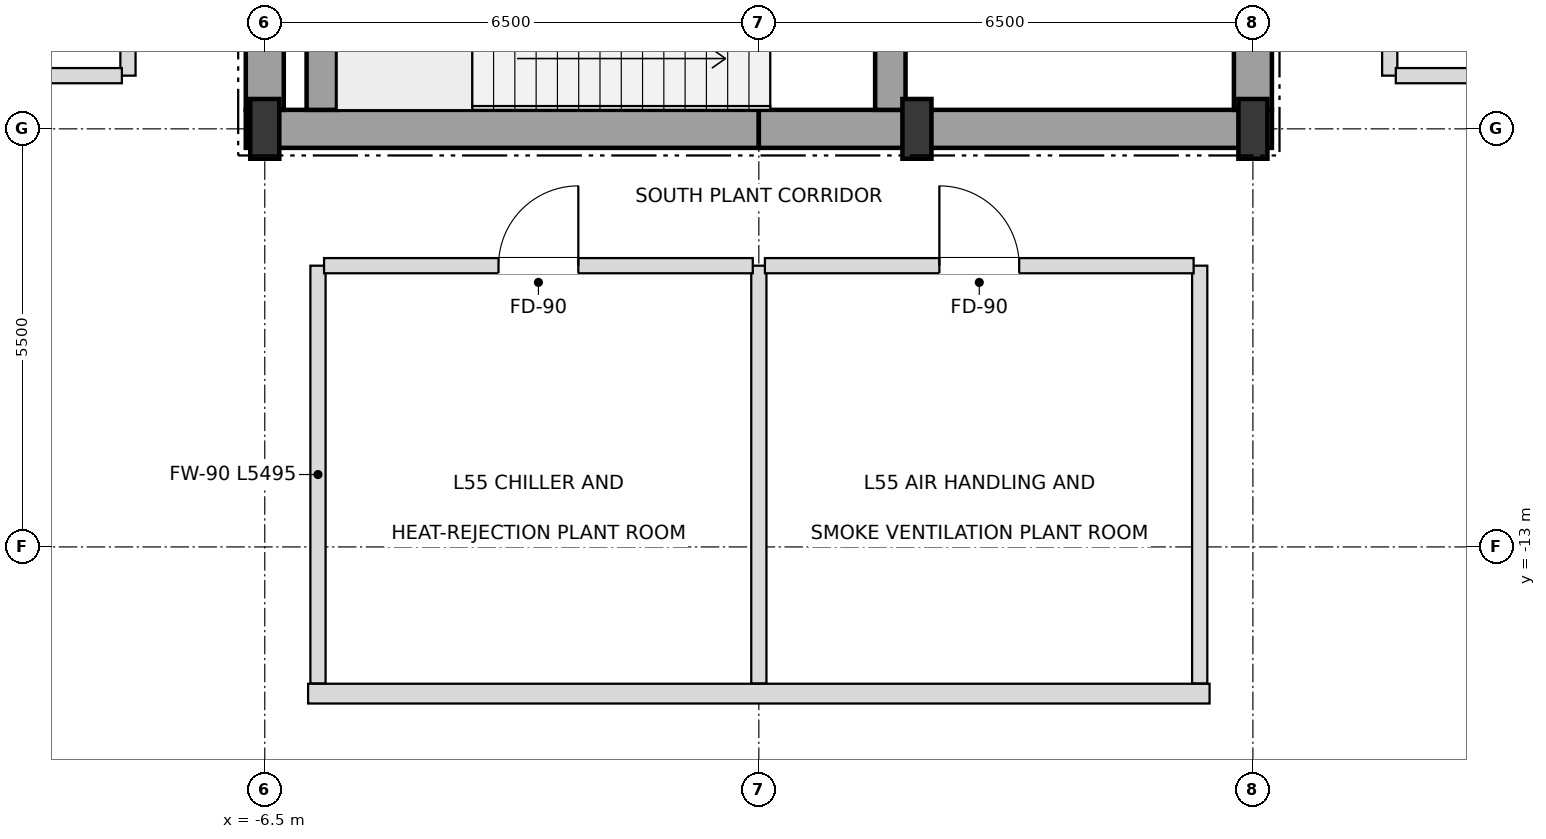
"""IFC4 building model, lengths in metres.
Left out: names, types, materials, properties, quantities, classifications, styles, units other than length and angle.
Written with IfcOpenShell. Run it as: python <this file> out.ifc"""

import sys

from ifc_helpers import new_model, si_unit, direction, frame, frame_2d, origin, origin_2d, place, context, subcontext, project, spatial, rectangle, i_section, extrude, element, fill, save


model = new_model("IFC4")
c1 = context("Model", 3, precision=1e-05, world=origin(), true_north=direction((0.0, 1.0)))
c2 = subcontext(c1, "Body", "Model", "MODEL_VIEW")
j1 = project(units=[si_unit("LENGTHUNIT", "METRE"), si_unit("PLANEANGLEUNIT", "RADIAN")], contexts=[c1])
p1 = place(None, origin())
s1 = spatial("IfcSite", under=j1, at=p1, CompositionType="ELEMENT")
p2 = place(p1, origin())
s2 = spatial("IfcBuilding", under=s1, at=p2, CompositionType="ELEMENT")
p3 = place(p2, frame((0.0, 0.0, 212.4)))
s3 = spatial("IfcBuildingStorey", under=s2, at=p3, CompositionType="ELEMENT", Elevation=212.4)
for number, where, z_axis, x_axis in (
    (1, (-6.5, -7.5, 0.0), (0.0, 0.0, 1.0), (1.0, 0.0, 0.0)),
    (2, (2.08, -7.5, 0.0), (0.0, 0.0, 1.0), (1.0, 0.0, 0.0)),
    (3, (6.5, -7.5, 0.0), (0.0, 0.0, 1.0), (1.0, 0.0, 0.0)),
):
    element("IfcColumn", number, at=place(p3, frame(where, z_axis=z_axis, x_axis=x_axis)), inside=s3, PredefinedType="COLUMN", context=c2, shape_type="SweptSolid", body=[
        extrude(i_section(OverallWidth=0.382, OverallDepth=0.786, WebThickness=0.02, FlangeThickness=0.033, at=origin_2d()), origin(), (0.0, 0.0, 1.0), 5.4),
    ])
p4 = place(p3, frame((-5.93, -14.93, 0.0), z_axis=(0.0, 0.0, 1.0), x_axis=(1.0, 0.0, 0.0)))
e4 = element("IfcWall", 4, at=p4, inside=s3, PredefinedType="SOLIDWALL", context=c2, shape_type="SweptSolid", body=[
    extrude(rectangle(XDim=11.86, YDim=0.26, at=frame_2d((5.93, 0.0))), origin(), (0.0, 0.0, 1.0), 5.1),
])
for number, where, z_axis, x_axis in (
    (5, (-6.75, -7.5, 0.0), (0.0, 0.0, 1.0), (1.0, 0.0, 0.0)),
    (6, (0.0, -7.5, 0.0), (0.0, 0.0, 1.0), (1.0, 0.0, 0.0)),
):
    element("IfcWall", number, at=place(p3, frame(where, z_axis=z_axis, x_axis=x_axis)), inside=s3, PredefinedType="SHEAR", context=c2, shape_type="SweptSolid", body=[
        extrude(rectangle(XDim=6.75, YDim=0.5, at=frame_2d((3.375, 0.0))), origin(), (0.0, 0.0, 1.0), 5.1),
    ])
p5 = place(p3, frame((-6.5, -7.25, 0.0), z_axis=(0.0, 0.0, 1.0), x_axis=(0.0, 1.0, 0.0)))
e7 = element("IfcWall", 7, at=p5, inside=s3, PredefinedType="SHEAR", context=c2, shape_type="SweptSolid", body=[
    extrude(rectangle(XDim=3.55, YDim=0.5, at=frame_2d((1.775, 0.0))), origin(), (0.0, 0.0, 1.0), 5.1),
])
p6 = place(p3, frame((6.5, -7.25, 0.0), z_axis=(0.0, 0.0, 1.0), x_axis=(0.0, 1.0, 0.0)))
e8 = element("IfcWall", 8, at=p6, inside=s3, PredefinedType="SHEAR", context=c2, shape_type="SweptSolid", body=[
    extrude(rectangle(XDim=5.75, YDim=0.5, at=frame_2d((2.875, 0.0))), origin(), (0.0, 0.0, 1.0), 5.1),
])
p7 = place(p6, frame((0.85, 0.0, 0.0)))
e9 = element("IfcOpeningElement", 9, at=p7, cuts=e8, PredefinedType="OPENING", context=c2, shape_type="SweptSolid", body=[
    extrude(rectangle(XDim=1.05, YDim=2.15, at=frame_2d((0.525, 1.075))), frame((0.0, 0.26, 0.0), z_axis=(0.0, -1.0, 0.0), x_axis=(1.0, 0.0, 0.0)), (0.0, 0.0, 1.0), 0.52),
])
p8 = place(p3, frame((-5.75, -7.25, 0.0), z_axis=(0.0, 0.0, 1.0), x_axis=(0.0, 1.0, 0.0)))
e10 = element("IfcWall", 10, at=p8, inside=s3, PredefinedType="SHEAR", context=c2, shape_type="SweptSolid", body=[
    extrude(rectangle(XDim=2.9, YDim=0.4, at=frame_2d((1.45, 0.0))), origin(), (0.0, 0.0, 1.0), 5.1),
])
p9 = place(p3, frame((1.73, -7.25, 0.0), z_axis=(0.0, 0.0, 1.0), x_axis=(0.0, 1.0, 0.0)))
e11 = element("IfcWall", 11, at=p9, inside=s3, PredefinedType="SHEAR", context=c2, shape_type="SweptSolid", body=[
    extrude(rectangle(XDim=3.3, YDim=0.4, at=frame_2d((1.65, 0.0))), origin(), (0.0, 0.0, 1.0), 5.1),
])
p10 = place(p9, frame((0.9, 0.0, 0.0)))
e12 = element("IfcOpeningElement", 12, at=p10, cuts=e11, PredefinedType="OPENING", context=c2, shape_type="SweptSolid", body=[
    extrude(rectangle(XDim=1.05, YDim=2.15, at=frame_2d((0.525, 1.075))), frame((0.0, 0.21, 0.0), z_axis=(0.0, -1.0, 0.0), x_axis=(1.0, 0.0, 0.0)), (0.0, 0.0, 1.0), 0.42),
])
p11 = place(p3, frame((-8.3, -6.8, 0.0), z_axis=(0.0, 0.0, 1.0), x_axis=(0.0, 1.0, 0.0)))
e13 = element("IfcWall", 13, at=p11, inside=s3, PredefinedType="SOLIDWALL", context=c2, shape_type="SweptSolid", body=[
    extrude(rectangle(XDim=13.6, YDim=0.2, at=frame_2d((6.8, 0.0))), origin(), (0.0, 0.0, 1.0), 5.1),
])
p12 = place(p11, frame((6.275, 0.0, 0.0)))
e14 = element("IfcOpeningElement", 14, at=p12, cuts=e13, PredefinedType="OPENING", context=c2, shape_type="SweptSolid", body=[
    extrude(rectangle(XDim=1.05, YDim=2.15, at=frame_2d((0.525, 1.075))), frame((0.0, 0.11, 0.0), z_axis=(0.0, -1.0, 0.0), x_axis=(1.0, 0.0, 0.0)), (0.0, 0.0, 1.0), 0.22),
])
for number, where, z_axis, x_axis in (
    (15, (-5.8, -14.795, 0.0), (0.0, 0.0, 1.0), (0.0, 1.0, 0.0)),
    (16, (0.0, -14.795, 0.0), (0.0, 0.0, 1.0), (0.0, 1.0, 0.0)),
    (17, (5.8, -14.795, 0.0), (0.0, 0.0, 1.0), (0.0, 1.0, 0.0)),
):
    element("IfcWall", number, at=place(p3, frame(where, z_axis=z_axis, x_axis=x_axis)), inside=s3, PredefinedType="SOLIDWALL", context=c2, shape_type="SweptSolid", body=[
        extrude(rectangle(XDim=5.495, YDim=0.2, at=frame_2d((2.748, 0.0))), origin(), (0.0, 0.0, 1.0), 5.1),
    ])
p13 = place(p3, frame((8.3, -6.8, 0.0), z_axis=(0.0, 0.0, 1.0), x_axis=(0.0, 1.0, 0.0)))
e18 = element("IfcWall", 18, at=p13, inside=s3, PredefinedType="SOLIDWALL", context=c2, shape_type="SweptSolid", body=[
    extrude(rectangle(XDim=13.6, YDim=0.2, at=frame_2d((6.8, 0.0))), origin(), (0.0, 0.0, 1.0), 5.1),
])
p14 = place(p13, frame((6.275, 0.0, 0.0)))
e19 = element("IfcOpeningElement", 19, at=p14, cuts=e18, PredefinedType="OPENING", context=c2, shape_type="SweptSolid", body=[
    extrude(rectangle(XDim=1.05, YDim=2.15, at=frame_2d((0.525, 1.075))), frame((0.0, 0.11, 0.0), z_axis=(0.0, -1.0, 0.0), x_axis=(1.0, 0.0, 0.0)), (0.0, 0.0, 1.0), 0.22),
])
p15 = place(p3, frame((-5.72, -9.3, 0.0), z_axis=(0.0, 0.0, 1.0), x_axis=(1.0, 0.0, 0.0)))
e20 = element("IfcWall", 20, at=p15, inside=s3, PredefinedType="SOLIDWALL", context=c2, shape_type="SweptSolid", body=[
    extrude(rectangle(XDim=5.64, YDim=0.2, at=frame_2d((2.82, 0.0))), origin(), (0.0, 0.0, 1.0), 5.1),
])
p16 = place(p15, frame((2.295, 0.0, 0.0)))
e21 = element("IfcOpeningElement", 21, at=p16, cuts=e20, PredefinedType="OPENING", context=c2, shape_type="SweptSolid", body=[
    extrude(rectangle(XDim=1.05, YDim=2.15, at=frame_2d((0.525, 1.075))), frame((0.0, 0.11, 0.0), z_axis=(0.0, -1.0, 0.0), x_axis=(1.0, 0.0, 0.0)), (0.0, 0.0, 1.0), 0.22),
])
p17 = place(p3, frame((0.08, -9.3, 0.0), z_axis=(0.0, 0.0, 1.0), x_axis=(1.0, 0.0, 0.0)))
e22 = element("IfcWall", 22, at=p17, inside=s3, PredefinedType="SOLIDWALL", context=c2, shape_type="SweptSolid", body=[
    extrude(rectangle(XDim=5.64, YDim=0.2, at=frame_2d((2.82, 0.0))), origin(), (0.0, 0.0, 1.0), 5.1),
])
p18 = place(p17, frame((2.295, 0.0, 0.0)))
e23 = element("IfcOpeningElement", 23, at=p18, cuts=e22, PredefinedType="OPENING", context=c2, shape_type="SweptSolid", body=[
    extrude(rectangle(XDim=1.05, YDim=2.15, at=frame_2d((0.525, 1.075))), frame((0.0, 0.11, 0.0), z_axis=(0.0, -1.0, 0.0), x_axis=(1.0, 0.0, 0.0)), (0.0, 0.0, 1.0), 0.22),
])
for number, where, z_axis, x_axis in (
    (24, (-16.195, -6.8, 0.0), (0.0, 0.0, 1.0), (1.0, 0.0, 0.0)),
    (25, (8.38, -6.8, 0.0), (0.0, 0.0, 1.0), (1.0, 0.0, 0.0)),
):
    element("IfcWall", number, at=place(p3, frame(where, z_axis=z_axis, x_axis=x_axis)), inside=s3, PredefinedType="SOLIDWALL", context=c2, shape_type="SweptSolid", body=[
        extrude(rectangle(XDim=7.815, YDim=0.2, at=frame_2d((3.908, 0.0))), origin(), (0.0, 0.0, 1.0), 4.738),
    ])
p19 = place(p16, origin())
e26 = element("IfcDoor", 26, at=p19, inside=s3, OperationType="SINGLE_SWING_RIGHT", PredefinedType="DOOR", context=c2, shape_type="SweptSolid", body=[
    extrude(rectangle(XDim=1.05, YDim=2.15, at=frame_2d((0.525, 1.075))), frame((0.0, 0.025, 0.0), z_axis=(0.0, -1.0, 0.0), x_axis=(1.0, 0.0, 0.0)), (0.0, 0.0, 1.0), 0.05),
])
fill(e21, e26)
p20 = place(p18, origin())
e27 = element("IfcDoor", 27, at=p20, inside=s3, OperationType="SINGLE_SWING_LEFT", PredefinedType="DOOR", context=c2, shape_type="SweptSolid", body=[
    extrude(rectangle(XDim=1.05, YDim=2.15, at=frame_2d((0.525, 1.075))), frame((0.0, 0.025, 0.0), z_axis=(0.0, -1.0, 0.0), x_axis=(1.0, 0.0, 0.0)), (0.0, 0.0, 1.0), 0.05),
])
fill(e23, e27)
save(model, sys.argv[1])
